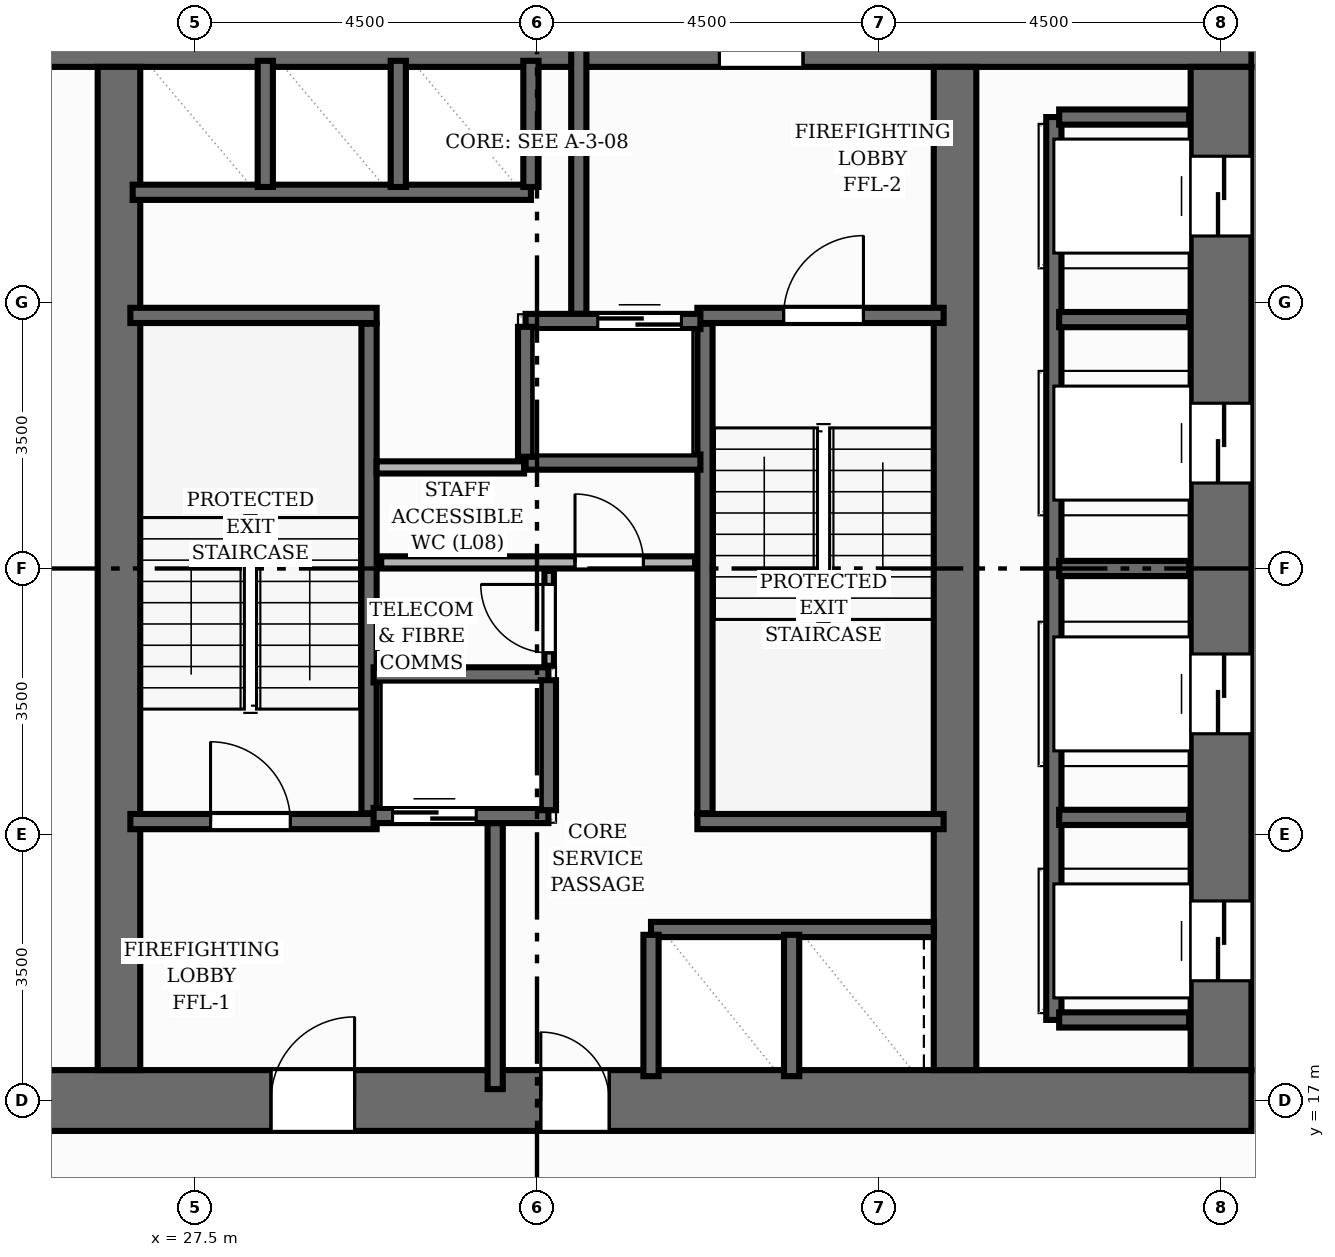
"""IFC4 building model, lengths in metres.
Left out: names, types, materials, properties, quantities, classifications, styles, units other than length and angle.
Written with IfcOpenShell. Run it as: python <this file> out.ifc"""

import sys

from ifc_helpers import new_model, si_unit, direction, frame, frame_2d, origin, place, context, subcontext, project, spatial, rectangle, extrude, element, fill, save


model = new_model("IFC4")
c1 = context("Model", 3, precision=1e-05, world=origin(), true_north=direction((0.0, 1.0)))
c2 = subcontext(c1, "Body", "Model", "MODEL_VIEW")
j1 = project(units=[si_unit("LENGTHUNIT", "METRE"), si_unit("PLANEANGLEUNIT", "RADIAN")], contexts=[c1])
p1 = place(None, origin())
s1 = spatial("IfcSite", under=j1, at=p1, CompositionType="ELEMENT")
p2 = place(p1, origin())
s2 = spatial("IfcBuilding", under=s1, at=p2, CompositionType="ELEMENT")
p3 = place(p2, frame((0.0, 0.0, 31.2)))
s3 = spatial("IfcBuildingStorey", under=s2, at=p3, CompositionType="ELEMENT", Elevation=31.2)
p4 = place(p3, frame((22.6, 17.0, 0.0), z_axis=(0.0, 0.0, 1.0), x_axis=(1.0, 0.0, 0.0)))
e1 = element("IfcWall", 1, at=p4, inside=s3, PredefinedType="SHEAR", context=c2, shape_type="SweptSolid", body=[
    extrude(rectangle(XDim=18.8, YDim=0.8, at=frame_2d((9.4, 0.0))), origin(), (0.0, 0.0, 1.0), 3.2),
])
p5 = place(p4, frame((5.9, 0.0, 0.0)))
e2 = element("IfcOpeningElement", 2, at=p5, cuts=e1, PredefinedType="OPENING", context=c2, shape_type="SweptSolid", body=[
    extrude(rectangle(XDim=1.1, YDim=2.15, at=frame_2d((0.55, 1.075))), frame((0.0, 0.41, 0.0), z_axis=(0.0, -1.0, 0.0), x_axis=(1.0, 0.0, 0.0)), (0.0, 0.0, 1.0), 0.82),
])
p6 = place(p4, frame((9.45, 0.0, 0.0)))
e3 = element("IfcOpeningElement", 3, at=p6, cuts=e1, PredefinedType="OPENING", context=c2, shape_type="SweptSolid", body=[
    extrude(rectangle(XDim=0.9, YDim=2.1, at=frame_2d((0.45, 1.05))), frame((0.0, 0.41, 0.0), z_axis=(0.0, -1.0, 0.0), x_axis=(1.0, 0.0, 0.0)), (0.0, 0.0, 1.0), 0.82),
])
p7 = place(p3, frame((22.6, 31.0, 0.0), z_axis=(0.0, 0.0, 1.0), x_axis=(1.0, 0.0, 0.0)))
e4 = element("IfcWall", 4, at=p7, inside=s3, PredefinedType="SHEAR", context=c2, shape_type="SweptSolid", body=[
    extrude(rectangle(XDim=18.8, YDim=0.8, at=frame_2d((9.4, 0.0))), origin(), (0.0, 0.0, 1.0), 3.2),
])
p8 = place(p7, frame((11.8, 0.0, 0.0)))
e5 = element("IfcOpeningElement", 5, at=p8, cuts=e4, PredefinedType="OPENING", context=c2, shape_type="SweptSolid", body=[
    extrude(rectangle(XDim=1.1, YDim=2.15, at=frame_2d((0.55, 1.075))), frame((0.0, 0.41, 0.0), z_axis=(0.0, -1.0, 0.0), x_axis=(1.0, 0.0, 0.0)), (0.0, 0.0, 1.0), 0.82),
])
p9 = place(p3, frame((41.0, 17.4, 0.0), z_axis=(0.0, 0.0, 1.0), x_axis=(0.0, 1.0, 0.0)))
e6 = element("IfcWall", 6, at=p9, inside=s3, PredefinedType="SHEAR", context=c2, shape_type="SweptSolid", body=[
    extrude(rectangle(XDim=13.2, YDim=0.8, at=frame_2d((6.6, 0.0))), origin(), (0.0, 0.0, 1.0), 3.2),
])
p10 = place(p9, frame((1.175, 0.0, 0.0)))
e7 = element("IfcOpeningElement", 7, at=p10, cuts=e6, PredefinedType="OPENING", context=c2, shape_type="SweptSolid", body=[
    extrude(rectangle(XDim=1.05, YDim=2.15, at=frame_2d((0.525, 1.075))), frame((0.0, 0.41, 0.0), z_axis=(0.0, -1.0, 0.0), x_axis=(1.0, 0.0, 0.0)), (0.0, 0.0, 1.0), 0.82),
])
p11 = place(p9, frame((4.425, 0.0, 0.0)))
e8 = element("IfcOpeningElement", 8, at=p11, cuts=e6, PredefinedType="OPENING", context=c2, shape_type="SweptSolid", body=[
    extrude(rectangle(XDim=1.05, YDim=2.15, at=frame_2d((0.525, 1.075))), frame((0.0, 0.41, 0.0), z_axis=(0.0, -1.0, 0.0), x_axis=(1.0, 0.0, 0.0)), (0.0, 0.0, 1.0), 0.82),
])
p12 = place(p9, frame((7.725, 0.0, 0.0)))
e9 = element("IfcOpeningElement", 9, at=p12, cuts=e6, PredefinedType="OPENING", context=c2, shape_type="SweptSolid", body=[
    extrude(rectangle(XDim=1.05, YDim=2.15, at=frame_2d((0.525, 1.075))), frame((0.0, 0.41, 0.0), z_axis=(0.0, -1.0, 0.0), x_axis=(1.0, 0.0, 0.0)), (0.0, 0.0, 1.0), 0.82),
])
p13 = place(p9, frame((10.975, 0.0, 0.0)))
e10 = element("IfcOpeningElement", 10, at=p13, cuts=e6, PredefinedType="OPENING", context=c2, shape_type="SweptSolid", body=[
    extrude(rectangle(XDim=1.05, YDim=2.15, at=frame_2d((0.525, 1.075))), frame((0.0, 0.41, 0.0), z_axis=(0.0, -1.0, 0.0), x_axis=(1.0, 0.0, 0.0)), (0.0, 0.0, 1.0), 0.82),
])
for number, where, z_axis, x_axis in (
    (11, (26.5, 17.4, 0.0), (0.0, 0.0, 1.0), (0.0, 1.0, 0.0)),
    (12, (37.5, 17.4, 0.0), (0.0, 0.0, 1.0), (0.0, 1.0, 0.0)),
):
    element("IfcWall", number, at=place(p3, frame(where, z_axis=z_axis, x_axis=x_axis)), inside=s3, PredefinedType="SHEAR", context=c2, shape_type="SweptSolid", body=[
        extrude(rectangle(XDim=13.2, YDim=0.56, at=frame_2d((6.6, 0.0))), origin(), (0.0, 0.0, 1.0), 3.2),
    ])
p14 = place(p3, frame((29.79, 20.78, 0.0), z_axis=(0.0, 0.0, 1.0), x_axis=(0.0, 1.0, 0.0)))
e13 = element("IfcWall", 13, at=p14, inside=s3, PredefinedType="SHEAR", context=c2, shape_type="SweptSolid", body=[
    extrude(rectangle(XDim=6.44, YDim=0.2, at=frame_2d((3.22, 0.0))), origin(), (0.0, 0.0, 1.0), 3.2),
])
p15 = place(p3, frame((26.65, 27.33, 0.0), z_axis=(0.0, 0.0, 1.0), x_axis=(1.0, 0.0, 0.0)))
e14 = element("IfcWall", 14, at=p15, inside=s3, PredefinedType="SHEAR", context=c2, shape_type="SweptSolid", body=[
    extrude(rectangle(XDim=3.24, YDim=0.2, at=frame_2d((1.62, 0.0))), origin(), (0.0, 0.0, 1.0), 3.2),
])
p16 = place(p3, frame((26.65, 20.67, 0.0), z_axis=(0.0, 0.0, 1.0), x_axis=(1.0, 0.0, 0.0)))
e15 = element("IfcWall", 15, at=p16, inside=s3, PredefinedType="SHEAR", context=c2, shape_type="SweptSolid", body=[
    extrude(rectangle(XDim=3.24, YDim=0.2, at=frame_2d((1.62, 0.0))), origin(), (0.0, 0.0, 1.0), 3.2),
])
p17 = place(p16, frame((1.055, 0.0, 0.0)))
e16 = element("IfcOpeningElement", 16, at=p17, cuts=e15, PredefinedType="OPENING", context=c2, shape_type="SweptSolid", body=[
    extrude(rectangle(XDim=1.05, YDim=2.15, at=frame_2d((0.525, 1.075))), frame((0.0, 0.11, 0.0), z_axis=(0.0, -1.0, 0.0), x_axis=(1.0, 0.0, 0.0)), (0.0, 0.0, 1.0), 0.22),
])
p18 = place(p3, frame((34.21, 20.78, 0.0), z_axis=(0.0, 0.0, 1.0), x_axis=(0.0, 1.0, 0.0)))
e17 = element("IfcWall", 17, at=p18, inside=s3, PredefinedType="SHEAR", context=c2, shape_type="SweptSolid", body=[
    extrude(rectangle(XDim=6.44, YDim=0.2, at=frame_2d((3.22, 0.0))), origin(), (0.0, 0.0, 1.0), 3.2),
])
p19 = place(p3, frame((34.11, 20.67, 0.0), z_axis=(0.0, 0.0, 1.0), x_axis=(1.0, 0.0, 0.0)))
e18 = element("IfcWall", 18, at=p19, inside=s3, PredefinedType="SHEAR", context=c2, shape_type="SweptSolid", body=[
    extrude(rectangle(XDim=3.24, YDim=0.2, at=frame_2d((1.62, 0.0))), origin(), (0.0, 0.0, 1.0), 3.2),
])
p20 = place(p3, frame((34.11, 27.33, 0.0), z_axis=(0.0, 0.0, 1.0), x_axis=(1.0, 0.0, 0.0)))
e19 = element("IfcWall", 19, at=p20, inside=s3, PredefinedType="SHEAR", context=c2, shape_type="SweptSolid", body=[
    extrude(rectangle(XDim=3.24, YDim=0.2, at=frame_2d((1.62, 0.0))), origin(), (0.0, 0.0, 1.0), 3.2),
])
p21 = place(p20, frame((1.135, 0.0, 0.0)))
e20 = element("IfcOpeningElement", 20, at=p21, cuts=e19, PredefinedType="OPENING", context=c2, shape_type="SweptSolid", body=[
    extrude(rectangle(XDim=1.05, YDim=2.15, at=frame_2d((0.525, 1.075))), frame((0.0, 0.11, 0.0), z_axis=(0.0, -1.0, 0.0), x_axis=(1.0, 0.0, 0.0)), (0.0, 0.0, 1.0), 0.22),
])
for number, where, z_axis, x_axis in (
    (21, (31.45, 17.15, 0.0), (0.0, 0.0, 1.0), (0.0, 1.0, 0.0)),
    (22, (32.55, 27.35, 0.0), (0.0, 0.0, 1.0), (0.0, 1.0, 0.0)),
):
    element("IfcWall", number, at=place(p3, frame(where, z_axis=z_axis, x_axis=x_axis)), inside=s3, PredefinedType="SHEAR", context=c2, shape_type="SweptSolid", body=[
        extrude(rectangle(XDim=3.5, YDim=0.2, at=frame_2d((1.75, 0.0))), origin(), (0.0, 0.0, 1.0), 3.2),
    ])
p22 = place(p3, frame((29.85, 20.75, 0.0), z_axis=(0.0, 0.0, 1.0), x_axis=(1.0, 0.0, 0.0)))
e23 = element("IfcWall", 23, at=p22, inside=s3, PredefinedType="SHEAR", context=c2, shape_type="SweptSolid", body=[
    extrude(rectangle(XDim=2.3, YDim=0.2, at=frame_2d((1.15, 0.0))), origin(), (0.0, 0.0, 1.0), 3.2),
])
p23 = place(p22, frame((0.25, 0.0, 0.0)))
e24 = element("IfcOpeningElement", 24, at=p23, cuts=e23, PredefinedType="OPENING", context=c2, shape_type="SweptSolid", body=[
    extrude(rectangle(XDim=1.1, YDim=2.15, at=frame_2d((0.55, 1.075))), frame((0.0, 0.11, 0.0), z_axis=(0.0, -1.0, 0.0), x_axis=(1.0, 0.0, 0.0)), (0.0, 0.0, 1.0), 0.22),
])
p24 = place(p3, frame((29.85, 22.6, 0.0), z_axis=(0.0, 0.0, 1.0), x_axis=(1.0, 0.0, 0.0)))
e25 = element("IfcWall", 25, at=p24, inside=s3, PredefinedType="SHEAR", context=c2, shape_type="SweptSolid", body=[
    extrude(rectangle(XDim=2.3, YDim=0.2, at=frame_2d((1.15, 0.0))), origin(), (0.0, 0.0, 1.0), 3.2),
])
p25 = place(p3, frame((32.15, 20.82, 0.0), z_axis=(0.0, 0.0, 1.0), x_axis=(0.0, 1.0, 0.0)))
e26 = element("IfcWall", 26, at=p25, inside=s3, PredefinedType="SHEAR", context=c2, shape_type="SweptSolid", body=[
    extrude(rectangle(XDim=1.71, YDim=0.2, at=frame_2d((0.855, 0.0))), origin(), (0.0, 0.0, 1.0), 3.2),
])
p26 = place(p3, frame((31.85, 27.25, 0.0), z_axis=(0.0, 0.0, 1.0), x_axis=(1.0, 0.0, 0.0)))
e27 = element("IfcWall", 27, at=p26, inside=s3, PredefinedType="SHEAR", context=c2, shape_type="SweptSolid", body=[
    extrude(rectangle(XDim=2.3, YDim=0.2, at=frame_2d((1.15, 0.0))), origin(), (0.0, 0.0, 1.0), 3.2),
])
p27 = place(p26, frame((0.95, 0.0, 0.0)))
e28 = element("IfcOpeningElement", 28, at=p27, cuts=e27, PredefinedType="OPENING", context=c2, shape_type="SweptSolid", body=[
    extrude(rectangle(XDim=1.1, YDim=2.15, at=frame_2d((0.55, 1.075))), frame((0.0, 0.11, 0.0), z_axis=(0.0, -1.0, 0.0), x_axis=(1.0, 0.0, 0.0)), (0.0, 0.0, 1.0), 0.22),
])
p28 = place(p3, frame((31.85, 25.4, 0.0), z_axis=(0.0, 0.0, 1.0), x_axis=(1.0, 0.0, 0.0)))
e29 = element("IfcWall", 29, at=p28, inside=s3, PredefinedType="SHEAR", context=c2, shape_type="SweptSolid", body=[
    extrude(rectangle(XDim=2.3, YDim=0.2, at=frame_2d((1.15, 0.0))), origin(), (0.0, 0.0, 1.0), 3.2),
])
p29 = place(p3, frame((31.85, 25.47, 0.0), z_axis=(0.0, 0.0, 1.0), x_axis=(0.0, 1.0, 0.0)))
e30 = element("IfcWall", 30, at=p29, inside=s3, PredefinedType="SHEAR", context=c2, shape_type="SweptSolid", body=[
    extrude(rectangle(XDim=1.71, YDim=0.2, at=frame_2d((0.855, 0.0))), origin(), (0.0, 0.0, 1.0), 3.2),
])
p30 = place(p3, frame((38.8, 18.06, 0.0), z_axis=(0.0, 0.0, 1.0), x_axis=(0.0, 1.0, 0.0)))
e31 = element("IfcWall", 31, at=p30, inside=s3, PredefinedType="SHEAR", context=c2, shape_type="SweptSolid", body=[
    extrude(rectangle(XDim=11.88, YDim=0.2, at=frame_2d((5.94, 0.0))), origin(), (0.0, 0.0, 1.0), 3.2),
])
for number, where, z_axis, x_axis in (
    (32, (38.87, 18.06, 0.0), (0.0, 0.0, 1.0), (1.0, 0.0, 0.0)),
    (33, (38.87, 29.94, 0.0), (0.0, 0.0, 1.0), (1.0, 0.0, 0.0)),
    (34, (38.87, 20.725, 0.0), (0.0, 0.0, 1.0), (1.0, 0.0, 0.0)),
    (35, (38.87, 24.0, 0.0), (0.0, 0.0, 1.0), (1.0, 0.0, 0.0)),
    (36, (38.87, 27.275, 0.0), (0.0, 0.0, 1.0), (1.0, 0.0, 0.0)),
):
    element("IfcWall", number, at=place(p3, frame(where, z_axis=z_axis, x_axis=x_axis)), inside=s3, PredefinedType="SHEAR", context=c2, shape_type="SweptSolid", body=[
        extrude(rectangle(XDim=1.71, YDim=0.2, at=frame_2d((0.855, 0.0))), origin(), (0.0, 0.0, 1.0), 3.2),
    ])
p31 = place(p3, frame((26.68, 28.95, 0.0), z_axis=(0.0, 0.0, 1.0), x_axis=(1.0, 0.0, 0.0)))
e37 = element("IfcWall", 37, at=p31, inside=s3, PredefinedType="SHEAR", context=c2, shape_type="SweptSolid", body=[
    extrude(rectangle(XDim=5.24, YDim=0.2, at=frame_2d((2.62, 0.0))), origin(), (0.0, 0.0, 1.0), 3.2),
])
for number, where, z_axis, x_axis in (
    (38, (31.92, 29.02, 0.0), (0.0, 0.0, 1.0), (0.0, 1.0, 0.0)),
    (39, (28.425, 29.02, 0.0), (0.0, 0.0, 1.0), (0.0, 1.0, 0.0)),
    (40, (30.175, 29.02, 0.0), (0.0, 0.0, 1.0), (0.0, 1.0, 0.0)),
):
    element("IfcWall", number, at=place(p3, frame(where, z_axis=z_axis, x_axis=x_axis)), inside=s3, PredefinedType="SHEAR", context=c2, shape_type="SweptSolid", body=[
        extrude(rectangle(XDim=1.66, YDim=0.2, at=frame_2d((0.83, 0.0))), origin(), (0.0, 0.0, 1.0), 3.2),
    ])
p32 = place(p3, frame((33.5, 19.25, 0.0), z_axis=(0.0, 0.0, 1.0), x_axis=(1.0, 0.0, 0.0)))
e41 = element("IfcWall", 41, at=p32, inside=s3, PredefinedType="SHEAR", context=c2, shape_type="SweptSolid", body=[
    extrude(rectangle(XDim=3.72, YDim=0.2, at=frame_2d((1.86, 0.0))), origin(), (0.0, 0.0, 1.0), 3.2),
])
for number, where, z_axis, x_axis in (
    (42, (33.5, 17.32, 0.0), (0.0, 0.0, 1.0), (0.0, 1.0, 0.0)),
    (43, (35.35, 17.32, 0.0), (0.0, 0.0, 1.0), (0.0, 1.0, 0.0)),
):
    element("IfcWall", number, at=place(p3, frame(where, z_axis=z_axis, x_axis=x_axis)), inside=s3, PredefinedType="SHEAR", context=c2, shape_type="SweptSolid", body=[
        extrude(rectangle(XDim=1.86, YDim=0.2, at=frame_2d((0.93, 0.0))), origin(), (0.0, 0.0, 1.0), 3.2),
    ])
p33 = place(p3, frame((29.95, 24.08, 0.0), z_axis=(0.0, 0.0, 1.0), x_axis=(1.0, 0.0, 0.0)))
e44 = element("IfcWall", 44, at=p33, inside=s3, PredefinedType="PLUMBINGWALL", context=c2, shape_type="SweptSolid", body=[
    extrude(rectangle(XDim=4.13, YDim=0.16, at=frame_2d((2.065, 0.0))), origin(), (0.0, 0.0, 1.0), 2.955),
])
p34 = place(p33, frame((2.55, 0.0, 0.0)))
e45 = element("IfcOpeningElement", 45, at=p34, cuts=e44, PredefinedType="OPENING", context=c2, shape_type="SweptSolid", body=[
    extrude(rectangle(XDim=0.9, YDim=2.1, at=frame_2d((0.45, 1.05))), frame((0.0, 0.09, 0.0), z_axis=(0.0, -1.0, 0.0), x_axis=(1.0, 0.0, 0.0)), (0.0, 0.0, 1.0), 0.18),
])
p35 = place(p3, frame((32.16, 22.72, 0.0), z_axis=(0.0, 0.0, 1.0), x_axis=(0.0, 1.0, 0.0)))
e46 = element("IfcWall", 46, at=p35, inside=s3, PredefinedType="PARTITIONING", context=c2, shape_type="SweptSolid", body=[
    extrude(rectangle(XDim=1.25, YDim=0.125, at=frame_2d((0.625, 0.0))), origin(), (0.0, 0.0, 1.0), 2.955),
])
p36 = place(p35, frame((0.17, 0.0, 0.0)))
e47 = element("IfcOpeningElement", 47, at=p36, cuts=e46, PredefinedType="OPENING", context=c2, shape_type="SweptSolid", body=[
    extrude(rectangle(XDim=0.9, YDim=2.1, at=frame_2d((0.45, 1.05))), frame((0.0, 0.073, 0.0), z_axis=(0.0, -1.0, 0.0), x_axis=(1.0, 0.0, 0.0)), (0.0, 0.0, 1.0), 0.145),
])
p37 = place(p3, frame((29.89, 25.33, 0.0), z_axis=(0.0, 0.0, 1.0), x_axis=(1.0, 0.0, 0.0)))
e48 = element("IfcWall", 48, at=p37, inside=s3, PredefinedType="PLUMBINGWALL", context=c2, shape_type="SweptSolid", body=[
    extrude(rectangle(XDim=1.94, YDim=0.16, at=frame_2d((0.97, 0.0))), origin(), (0.0, 0.0, 1.0), 2.955),
])
p38 = place(p17, origin())
e49 = element("IfcDoor", 49, at=p38, inside=s3, OperationType="SINGLE_SWING_LEFT", PredefinedType="DOOR", context=c2, shape_type="SweptSolid", body=[
    extrude(rectangle(XDim=1.05, YDim=2.15, at=frame_2d((0.525, 1.075))), frame((0.0, 0.025, 0.0), z_axis=(0.0, -1.0, 0.0), x_axis=(1.0, 0.0, 0.0)), (0.0, 0.0, 1.0), 0.05),
])
fill(e16, e49)
p39 = place(p21, origin())
e50 = element("IfcDoor", 50, at=p39, inside=s3, OperationType="SINGLE_SWING_RIGHT", PredefinedType="DOOR", context=c2, shape_type="SweptSolid", body=[
    extrude(rectangle(XDim=1.05, YDim=2.15, at=frame_2d((0.525, 1.075))), frame((0.0, 0.025, 0.0), z_axis=(0.0, -1.0, 0.0), x_axis=(1.0, 0.0, 0.0)), (0.0, 0.0, 1.0), 0.05),
])
fill(e20, e50)
p40 = place(p5, origin())
e51 = element("IfcDoor", 51, at=p40, inside=s3, OperationType="SINGLE_SWING_RIGHT", PredefinedType="DOOR", context=c2, shape_type="SweptSolid", body=[
    extrude(rectangle(XDim=1.1, YDim=2.15, at=frame_2d((0.55, 1.075))), frame((0.0, 0.025, 0.0), z_axis=(0.0, -1.0, 0.0), x_axis=(1.0, 0.0, 0.0)), (0.0, 0.0, 1.0), 0.05),
])
fill(e2, e51)
p41 = place(p23, origin())
e52 = element("IfcDoor", 52, at=p41, inside=s3, OperationType="DOUBLE_DOOR_SLIDING", PredefinedType="DOOR", context=c2, shape_type="SweptSolid", body=[
    extrude(rectangle(XDim=1.1, YDim=2.15, at=frame_2d((0.55, 1.075))), frame((0.0, 0.025, 0.0), z_axis=(0.0, -1.0, 0.0), x_axis=(1.0, 0.0, 0.0)), (0.0, 0.0, 1.0), 0.05),
])
fill(e24, e52)
p42 = place(p27, origin())
e53 = element("IfcDoor", 53, at=p42, inside=s3, OperationType="DOUBLE_DOOR_SLIDING", PredefinedType="DOOR", context=c2, shape_type="SweptSolid", body=[
    extrude(rectangle(XDim=1.1, YDim=2.15, at=frame_2d((0.55, 1.075))), frame((0.0, 0.025, 0.0), z_axis=(0.0, -1.0, 0.0), x_axis=(1.0, 0.0, 0.0)), (0.0, 0.0, 1.0), 0.05),
])
fill(e28, e53)
p43 = place(p10, origin())
e54 = element("IfcDoor", 54, at=p43, inside=s3, OperationType="DOUBLE_DOOR_SLIDING", PredefinedType="DOOR", context=c2, shape_type="SweptSolid", body=[
    extrude(rectangle(XDim=1.05, YDim=2.15, at=frame_2d((0.525, 1.075))), frame((0.0, 0.025, 0.0), z_axis=(0.0, -1.0, 0.0), x_axis=(1.0, 0.0, 0.0)), (0.0, 0.0, 1.0), 0.05),
])
fill(e7, e54)
p44 = place(p11, origin())
e55 = element("IfcDoor", 55, at=p44, inside=s3, OperationType="DOUBLE_DOOR_SLIDING", PredefinedType="DOOR", context=c2, shape_type="SweptSolid", body=[
    extrude(rectangle(XDim=1.05, YDim=2.15, at=frame_2d((0.525, 1.075))), frame((0.0, 0.025, 0.0), z_axis=(0.0, -1.0, 0.0), x_axis=(1.0, 0.0, 0.0)), (0.0, 0.0, 1.0), 0.05),
])
fill(e8, e55)
p45 = place(p12, origin())
e56 = element("IfcDoor", 56, at=p45, inside=s3, OperationType="DOUBLE_DOOR_SLIDING", PredefinedType="DOOR", context=c2, shape_type="SweptSolid", body=[
    extrude(rectangle(XDim=1.05, YDim=2.15, at=frame_2d((0.525, 1.075))), frame((0.0, 0.025, 0.0), z_axis=(0.0, -1.0, 0.0), x_axis=(1.0, 0.0, 0.0)), (0.0, 0.0, 1.0), 0.05),
])
fill(e9, e56)
p46 = place(p13, origin())
e57 = element("IfcDoor", 57, at=p46, inside=s3, OperationType="DOUBLE_DOOR_SLIDING", PredefinedType="DOOR", context=c2, shape_type="SweptSolid", body=[
    extrude(rectangle(XDim=1.05, YDim=2.15, at=frame_2d((0.525, 1.075))), frame((0.0, 0.025, 0.0), z_axis=(0.0, -1.0, 0.0), x_axis=(1.0, 0.0, 0.0)), (0.0, 0.0, 1.0), 0.05),
])
fill(e10, e57)
p47 = place(p6, origin())
e58 = element("IfcDoor", 58, at=p47, inside=s3, OperationType="SINGLE_SWING_LEFT", PredefinedType="DOOR", context=c2, shape_type="SweptSolid", body=[
    extrude(rectangle(XDim=0.9, YDim=2.1, at=frame_2d((0.45, 1.05))), frame((0.0, 0.025, 0.0), z_axis=(0.0, -1.0, 0.0), x_axis=(1.0, 0.0, 0.0)), (0.0, 0.0, 1.0), 0.05),
])
fill(e3, e58)
p48 = place(p34, origin())
e59 = element("IfcDoor", 59, at=p48, inside=s3, OperationType="SINGLE_SWING_LEFT", PredefinedType="DOOR", context=c2, shape_type="SweptSolid", body=[
    extrude(rectangle(XDim=0.9, YDim=2.1, at=frame_2d((0.45, 1.05))), frame((0.0, 0.025, 0.0), z_axis=(0.0, -1.0, 0.0), x_axis=(1.0, 0.0, 0.0)), (0.0, 0.0, 1.0), 0.05),
])
fill(e45, e59)
p49 = place(p36, origin())
e60 = element("IfcDoor", 60, at=p49, inside=s3, OperationType="SINGLE_SWING_RIGHT", PredefinedType="DOOR", context=c2, shape_type="SweptSolid", body=[
    extrude(rectangle(XDim=0.9, YDim=2.1, at=frame_2d((0.45, 1.05))), frame((0.0, 0.025, 0.0), z_axis=(0.0, -1.0, 0.0), x_axis=(1.0, 0.0, 0.0)), (0.0, 0.0, 1.0), 0.05),
])
fill(e47, e60)
save(model, sys.argv[1])
